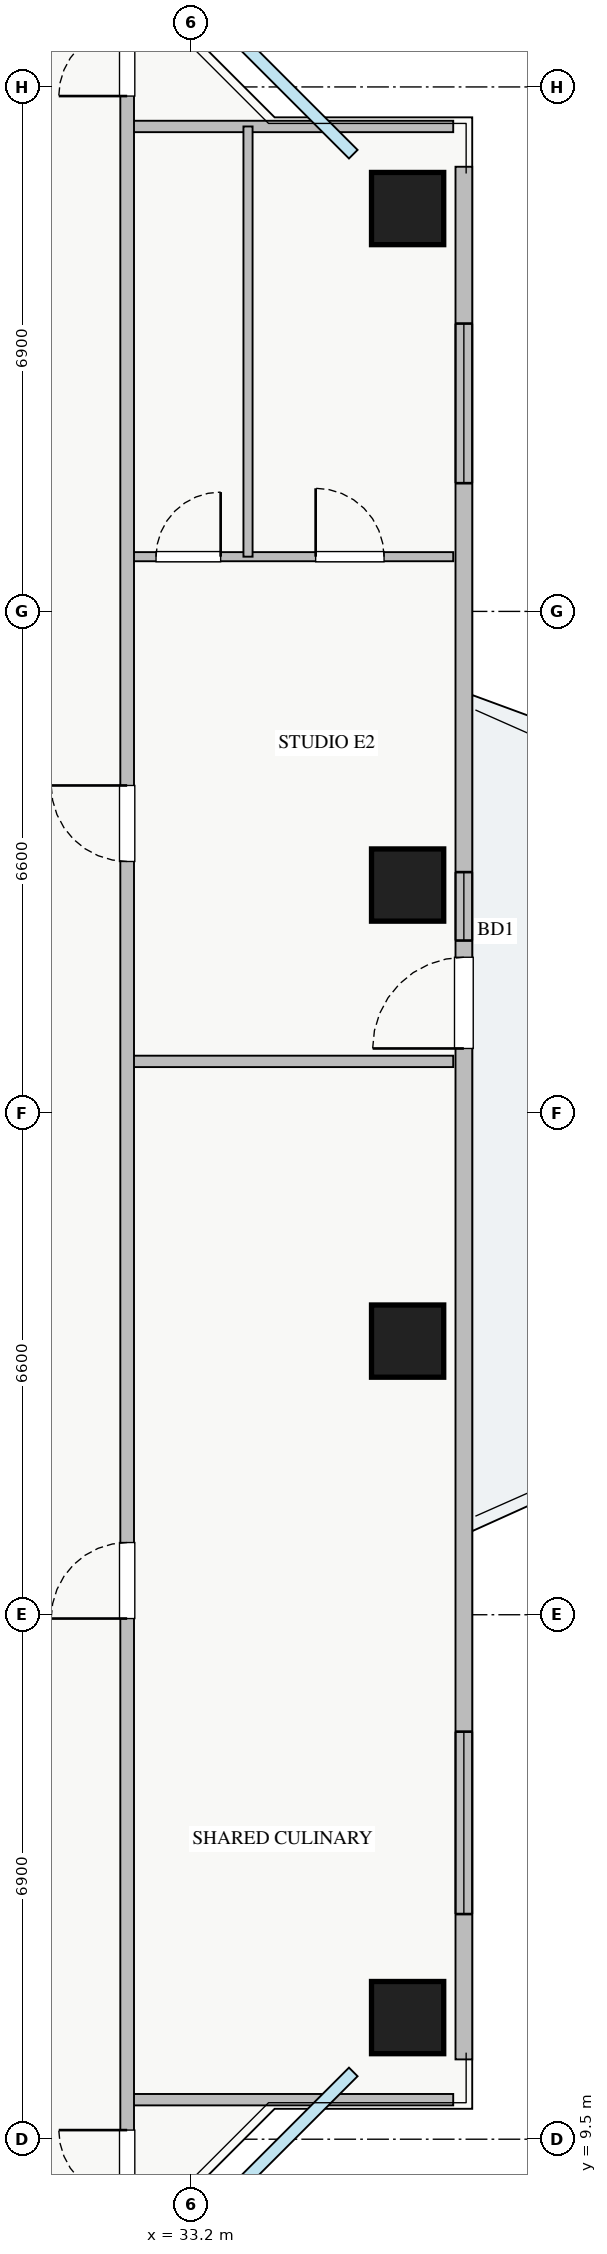
"""IFC4 building model, lengths in metres.
Left out: names, types, materials, properties, quantities, classifications, styles, units other than length and angle.
Written with IfcOpenShell. Run it as: python <this file> out.ifc"""

import sys

from ifc_helpers import new_model, si_unit, direction, frame, frame_2d, origin, origin_2d, place, context, subcontext, project, spatial, rectangle, extrude, source, transform, mapped, element, fill, save


model = new_model("IFC4")
c1 = context("Model", 3, precision=1e-05, world=origin(), true_north=direction((0.0, 1.0)))
c2 = subcontext(c1, "Body", "Model", "MODEL_VIEW")
j1 = project(units=[si_unit("LENGTHUNIT", "METRE"), si_unit("PLANEANGLEUNIT", "RADIAN")], contexts=[c1])
p1 = place(None, origin())
s1 = spatial("IfcSite", under=j1, at=p1, CompositionType="ELEMENT")
p2 = place(p1, origin())
s2 = spatial("IfcBuilding", under=s1, at=p2, CompositionType="ELEMENT")
p3 = place(p2, frame((0.0, 0.0, 143.75)))
s3 = spatial("IfcBuildingStorey", under=s2, at=p3, CompositionType="ELEMENT", Elevation=143.75)
m1 = source(origin(), c2, "Body", "SweptSolid", [
    extrude(rectangle(XDim=0.95, YDim=0.95, at=origin_2d()), origin(), (0.0, 0.0, 1.0), 3.25),
])
for number, where, z_axis, x_axis in (
    (1, (36.05, 11.1, 0.0), (0.0, 0.0, 1.0), (1.0, 0.0, 0.0)),
    (2, (36.05, 20.0, 0.0), (0.0, 0.0, 1.0), (1.0, 0.0, 0.0)),
    (3, (36.05, 26.0, 0.0), (0.0, 0.0, 1.0), (1.0, 0.0, 0.0)),
    (4, (36.05, 34.9, 0.0), (0.0, 0.0, 1.0), (1.0, 0.0, 0.0)),
):
    element("IfcColumn", number, at=place(p3, frame(where, z_axis=z_axis, x_axis=x_axis)), inside=s3, PredefinedType="COLUMN", context=c2, shape_type="MappedRepresentation", body=[
        mapped(m1, transform((0.0, 0.0, 0.0), x_axis=(1.0, 0.0, 0.0), y_axis=(0.0, 1.0, 0.0), z_axis=(0.0, 0.0, 1.0), scale=1.0)),
    ])
p4 = place(p3, frame((36.79, 10.55, 0.0), z_axis=(0.0, 0.0, 1.0), x_axis=(0.0, 1.0, 0.0)))
e5 = element("IfcWall", 5, at=p4, inside=s3, PredefinedType="STANDARD", context=c2, shape_type="SweptSolid", body=[
    extrude(rectangle(XDim=24.9, YDim=0.22, at=frame_2d((12.45, 0.0))), origin(), (0.0, 0.0, 1.0), 2.61),
])
p5 = place(p4, frame((13.3, 0.0, 0.0)))
e6 = element("IfcOpeningElement", 6, at=p5, cuts=e5, PredefinedType="OPENING", context=c2, shape_type="SweptSolid", body=[
    extrude(rectangle(XDim=1.2, YDim=2.1, at=frame_2d((0.6, 1.05))), frame((0.0, 0.12, 0.0), z_axis=(0.0, -1.0, 0.0), x_axis=(1.0, 0.0, 0.0)), (0.0, 0.0, 1.0), 0.24),
])
p6 = place(p4, frame((1.912, 0.0, 0.9)))
e7 = element("IfcOpeningElement", 7, at=p6, cuts=e5, PredefinedType="OPENING", context=c2, shape_type="SweptSolid", body=[
    extrude(rectangle(XDim=2.4, YDim=1.48, at=frame_2d((1.2, 0.74))), frame((0.0, 0.12, 0.0), z_axis=(0.0, -1.0, 0.0), x_axis=(1.0, 0.0, 0.0)), (0.0, 0.0, 1.0), 0.24),
])
p7 = place(p4, frame((20.737, 0.0, 0.9)))
e8 = element("IfcOpeningElement", 8, at=p7, cuts=e5, PredefinedType="OPENING", context=c2, shape_type="SweptSolid", body=[
    extrude(rectangle(XDim=2.1, YDim=1.48, at=frame_2d((1.05, 0.74))), frame((0.0, 0.12, 0.0), z_axis=(0.0, -1.0, 0.0), x_axis=(1.0, 0.0, 0.0)), (0.0, 0.0, 1.0), 0.24),
])
p8 = place(p4, frame((14.72, 0.0, 0.9)))
e9 = element("IfcOpeningElement", 9, at=p8, cuts=e5, PredefinedType="OPENING", context=c2, shape_type="SweptSolid", body=[
    extrude(rectangle(XDim=0.9, YDim=1.2, at=frame_2d((0.45, 0.6))), frame((0.0, 0.12, 0.0), z_axis=(0.0, -1.0, 0.0), x_axis=(1.0, 0.0, 0.0)), (0.0, 0.0, 1.0), 0.24),
])
for number, where, z_axis, x_axis in (
    (10, (32.36, 35.98, 0.0), (0.0, 0.0, 1.0), (1.0, 0.0, 0.0)),
    (11, (32.36, 10.02, 0.0), (0.0, 0.0, 1.0), (1.0, 0.0, 0.0)),
):
    element("IfcWall", number, at=place(p3, frame(where, z_axis=z_axis, x_axis=x_axis)), inside=s3, PredefinedType="PARTITIONING", context=c2, shape_type="SweptSolid", body=[
        extrude(rectangle(XDim=4.29, YDim=0.15, at=frame_2d((2.145, 0.0))), origin(), (0.0, 0.0, 1.0), 3.07),
    ])
p9 = place(p3, frame((32.36, 30.32, 0.0), z_axis=(0.0, 0.0, 1.0), x_axis=(1.0, 0.0, 0.0)))
e12 = element("IfcWall", 12, at=p9, inside=s3, PredefinedType="PLUMBINGWALL", context=c2, shape_type="SweptSolid", body=[
    extrude(rectangle(XDim=4.29, YDim=0.12, at=frame_2d((2.145, 0.0))), origin(), (0.0, 0.0, 1.0), 3.07),
])
p10 = place(p9, frame((0.38, 0.0, 0.0)))
e13 = element("IfcOpeningElement", 13, at=p10, cuts=e12, PredefinedType="OPENING", context=c2, shape_type="SweptSolid", body=[
    extrude(rectangle(XDim=0.85, YDim=2.05, at=frame_2d((0.425, 1.025))), frame((0.0, 0.07, 0.0), z_axis=(0.0, -1.0, 0.0), x_axis=(1.0, 0.0, 0.0)), (0.0, 0.0, 1.0), 0.14),
])
p11 = place(p9, frame((2.48, 0.0, 0.0)))
e14 = element("IfcOpeningElement", 14, at=p11, cuts=e12, PredefinedType="OPENING", context=c2, shape_type="SweptSolid", body=[
    extrude(rectangle(XDim=0.9, YDim=2.05, at=frame_2d((0.45, 1.025))), frame((0.0, 0.07, 0.0), z_axis=(0.0, -1.0, 0.0), x_axis=(1.0, 0.0, 0.0)), (0.0, 0.0, 1.0), 0.14),
])
p12 = place(p3, frame((33.95, 30.32, 0.0), z_axis=(0.0, 0.0, 1.0), x_axis=(0.0, 1.0, 0.0)))
e15 = element("IfcWall", 15, at=p12, inside=s3, PredefinedType="PLUMBINGWALL", context=c2, shape_type="SweptSolid", body=[
    extrude(rectangle(XDim=5.66, YDim=0.12, at=frame_2d((2.83, 0.0))), origin(), (0.0, 0.0, 1.0), 3.07),
])
p13 = place(p3, frame((32.36, 23.68, 0.0), z_axis=(0.0, 0.0, 1.0), x_axis=(1.0, 0.0, 0.0)))
e16 = element("IfcWall", 16, at=p13, inside=s3, PredefinedType="PARTITIONING", context=c2, shape_type="SweptSolid", body=[
    extrude(rectangle(XDim=4.29, YDim=0.15, at=frame_2d((2.145, 0.0))), origin(), (0.0, 0.0, 1.0), 3.07),
])
p14 = place(p3, frame((32.36, 8.3, 0.0), z_axis=(0.0, 0.0, 1.0), x_axis=(0.0, 1.0, 0.0)))
e17 = element("IfcWall", 17, at=p14, inside=s3, PredefinedType="PARTITIONING", context=c2, shape_type="SweptSolid", body=[
    extrude(rectangle(XDim=29.4, YDim=0.18, at=frame_2d((14.7, 0.0))), origin(), (0.0, 0.0, 1.0), 3.07),
])
p15 = place(p14, frame((28.08, 0.0, 0.0)))
e18 = element("IfcOpeningElement", 18, at=p15, cuts=e17, PredefinedType="OPENING", context=c2, shape_type="SweptSolid", body=[
    extrude(rectangle(XDim=0.9, YDim=2.05, at=frame_2d((0.45, 1.025))), frame((0.0, 0.1, 0.0), z_axis=(0.0, -1.0, 0.0), x_axis=(1.0, 0.0, 0.0)), (0.0, 0.0, 1.0), 0.2),
])
p16 = place(p14, frame((0.42, 0.0, 0.0)))
e19 = element("IfcOpeningElement", 19, at=p16, cuts=e17, PredefinedType="OPENING", context=c2, shape_type="SweptSolid", body=[
    extrude(rectangle(XDim=0.9, YDim=2.05, at=frame_2d((0.45, 1.025))), frame((0.0, 0.1, 0.0), z_axis=(0.0, -1.0, 0.0), x_axis=(1.0, 0.0, 0.0)), (0.0, 0.0, 1.0), 0.2),
])
p17 = place(p14, frame((8.05, 0.0, 0.0)))
e20 = element("IfcOpeningElement", 20, at=p17, cuts=e17, PredefinedType="OPENING", context=c2, shape_type="SweptSolid", body=[
    extrude(rectangle(XDim=1.0, YDim=2.05, at=frame_2d((0.5, 1.025))), frame((0.0, 0.1, 0.0), z_axis=(0.0, -1.0, 0.0), x_axis=(1.0, 0.0, 0.0)), (0.0, 0.0, 1.0), 0.2),
])
p18 = place(p14, frame((18.01, 0.0, 0.0)))
e21 = element("IfcOpeningElement", 21, at=p18, cuts=e17, PredefinedType="OPENING", context=c2, shape_type="SweptSolid", body=[
    extrude(rectangle(XDim=1.0, YDim=2.05, at=frame_2d((0.5, 1.025))), frame((0.0, 0.1, 0.0), z_axis=(0.0, -1.0, 0.0), x_axis=(1.0, 0.0, 0.0)), (0.0, 0.0, 1.0), 0.2),
])
m2 = source(origin(), c2, "Body", "SweptSolid", [
    extrude(rectangle(XDim=1.2, YDim=2.1, at=frame_2d((0.6, 1.05))), frame((0.0, 0.025, 0.0), z_axis=(0.0, -1.0, 0.0), x_axis=(1.0, 0.0, 0.0)), (0.0, 0.0, 1.0), 0.05),
])
p19 = place(p5, origin())
e22 = element("IfcDoor", 22, at=p19, inside=s3, OperationType="SINGLE_SWING_LEFT", PredefinedType="DOOR", context=c2, shape_type="MappedRepresentation", body=[
    mapped(m2, transform((0.0, 0.0, 0.0), x_axis=(1.0, 0.0, 0.0), y_axis=(0.0, 1.0, 0.0), z_axis=(0.0, 0.0, 1.0), scale=1.0)),
])
fill(e6, e22)
m3 = source(origin(), c2, "Body", "SweptSolid", [
    extrude(rectangle(XDim=2.4, YDim=1.48, at=frame_2d((1.2, 0.74))), frame((0.0, 0.03, 0.0), z_axis=(0.0, -1.0, 0.0), x_axis=(1.0, 0.0, 0.0)), (0.0, 0.0, 1.0), 0.06),
])
p20 = place(p6, origin())
e23 = element("IfcWindow", 23, at=p20, inside=s3, PartitioningType="TRIPLE_PANEL_VERTICAL", PredefinedType="WINDOW", context=c2, shape_type="MappedRepresentation", body=[
    mapped(m3, transform((0.0, 0.0, 0.0), x_axis=(1.0, 0.0, 0.0), y_axis=(0.0, 1.0, 0.0), z_axis=(0.0, 0.0, 1.0), scale=1.0)),
])
fill(e7, e23)
m4 = source(origin(), c2, "Body", "SweptSolid", [
    extrude(rectangle(XDim=2.1, YDim=1.48, at=frame_2d((1.05, 0.74))), frame((0.0, 0.03, 0.0), z_axis=(0.0, -1.0, 0.0), x_axis=(1.0, 0.0, 0.0)), (0.0, 0.0, 1.0), 0.06),
])
p21 = place(p7, origin())
e24 = element("IfcWindow", 24, at=p21, inside=s3, PartitioningType="TRIPLE_PANEL_VERTICAL", PredefinedType="WINDOW", context=c2, shape_type="MappedRepresentation", body=[
    mapped(m4, transform((0.0, 0.0, 0.0), x_axis=(1.0, 0.0, 0.0), y_axis=(0.0, 1.0, 0.0), z_axis=(0.0, 0.0, 1.0), scale=1.0)),
])
fill(e8, e24)
m5 = source(origin(), c2, "Body", "SweptSolid", [
    extrude(rectangle(XDim=0.85, YDim=2.05, at=frame_2d((0.425, 1.025))), frame((0.0, 0.025, 0.0), z_axis=(0.0, -1.0, 0.0), x_axis=(1.0, 0.0, 0.0)), (0.0, 0.0, 1.0), 0.05),
])
p22 = place(p10, origin())
e25 = element("IfcDoor", 25, at=p22, inside=s3, OperationType="SINGLE_SWING_RIGHT", PredefinedType="DOOR", context=c2, shape_type="MappedRepresentation", body=[
    mapped(m5, transform((0.0, 0.0, 0.0), x_axis=(1.0, 0.0, 0.0), y_axis=(0.0, 1.0, 0.0), z_axis=(0.0, 0.0, 1.0), scale=1.0)),
])
fill(e13, e25)
m6 = source(origin(), c2, "Body", "SweptSolid", [
    extrude(rectangle(XDim=0.9, YDim=2.05, at=frame_2d((0.45, 1.025))), frame((0.0, 0.025, 0.0), z_axis=(0.0, -1.0, 0.0), x_axis=(1.0, 0.0, 0.0)), (0.0, 0.0, 1.0), 0.05),
])
p23 = place(p11, origin())
e26 = element("IfcDoor", 26, at=p23, inside=s3, OperationType="SINGLE_SWING_LEFT", PredefinedType="DOOR", context=c2, shape_type="MappedRepresentation", body=[
    mapped(m6, transform((0.0, 0.0, 0.0), x_axis=(1.0, 0.0, 0.0), y_axis=(0.0, 1.0, 0.0), z_axis=(0.0, 0.0, 1.0), scale=1.0)),
])
fill(e14, e26)
p24 = place(p15, origin())
e27 = element("IfcDoor", 27, at=p24, inside=s3, OperationType="SINGLE_SWING_LEFT", PredefinedType="DOOR", context=c2, shape_type="MappedRepresentation", body=[
    mapped(m6, transform((0.0, 0.0, 0.0), x_axis=(1.0, 0.0, 0.0), y_axis=(0.0, 1.0, 0.0), z_axis=(0.0, 0.0, 1.0), scale=1.0)),
])
fill(e18, e27)
p25 = place(p16, origin())
e28 = element("IfcDoor", 28, at=p25, inside=s3, OperationType="SINGLE_SWING_RIGHT", PredefinedType="DOOR", context=c2, shape_type="MappedRepresentation", body=[
    mapped(m6, transform((0.0, 0.0, 0.0), x_axis=(1.0, 0.0, 0.0), y_axis=(0.0, 1.0, 0.0), z_axis=(0.0, 0.0, 1.0), scale=1.0)),
])
fill(e19, e28)
m7 = source(origin(), c2, "Body", "SweptSolid", [
    extrude(rectangle(XDim=1.0, YDim=2.05, at=frame_2d((0.5, 1.025))), frame((0.0, 0.025, 0.0), z_axis=(0.0, -1.0, 0.0), x_axis=(1.0, 0.0, 0.0)), (0.0, 0.0, 1.0), 0.05),
])
p26 = place(p17, origin())
e29 = element("IfcDoor", 29, at=p26, inside=s3, OperationType="SINGLE_SWING_LEFT", PredefinedType="DOOR", context=c2, shape_type="MappedRepresentation", body=[
    mapped(m7, transform((0.0, 0.0, 0.0), x_axis=(1.0, 0.0, 0.0), y_axis=(0.0, 1.0, 0.0), z_axis=(0.0, 0.0, 1.0), scale=1.0)),
])
fill(e20, e29)
p27 = place(p18, origin())
e30 = element("IfcDoor", 30, at=p27, inside=s3, OperationType="SINGLE_SWING_RIGHT", PredefinedType="DOOR", context=c2, shape_type="MappedRepresentation", body=[
    mapped(m7, transform((0.0, 0.0, 0.0), x_axis=(1.0, 0.0, 0.0), y_axis=(0.0, 1.0, 0.0), z_axis=(0.0, 0.0, 1.0), scale=1.0)),
])
fill(e21, e30)
m8 = source(origin(), c2, "Body", "SweptSolid", [
    extrude(rectangle(XDim=0.9, YDim=1.2, at=frame_2d((0.45, 0.6))), frame((0.0, 0.03, 0.0), z_axis=(0.0, -1.0, 0.0), x_axis=(1.0, 0.0, 0.0)), (0.0, 0.0, 1.0), 0.06),
])
p28 = place(p8, origin())
e31 = element("IfcWindow", 31, at=p28, inside=s3, PartitioningType="SINGLE_PANEL", PredefinedType="WINDOW", context=c2, shape_type="MappedRepresentation", body=[
    mapped(m8, transform((0.0, 0.0, 0.0), x_axis=(1.0, 0.0, 0.0), y_axis=(0.0, 1.0, 0.0), z_axis=(0.0, 0.0, 1.0), scale=1.0)),
])
fill(e9, e31)
save(model, sys.argv[1])
